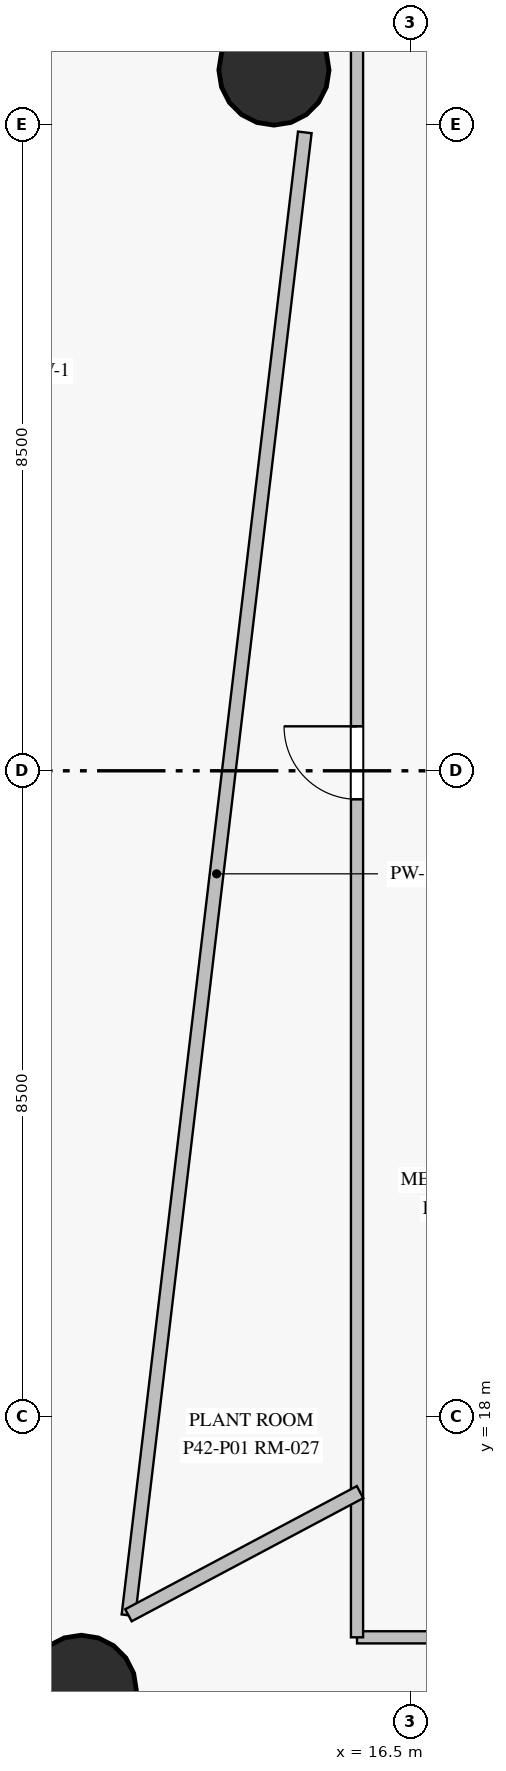
"""IFC4 building model, lengths in metres.
Left out: names, types, materials, properties, quantities, classifications, styles, units other than length and angle.
Written with IfcOpenShell. Run it as: python <this file> out.ifc"""

import sys

from ifc_helpers import new_model, si_unit, direction, frame, frame_2d, origin, origin_with_axes, origin_2d, place, context, subcontext, project, spatial, rectangle, circle, extrude, source, transform, mapped, element, fill, save


model = new_model("IFC4")
c1 = context("Model", 3, precision=1e-05, world=origin(), true_north=direction((0.0, 1.0)))
c2 = subcontext(c1, "Body", "Model", "MODEL_VIEW")
j1 = project(units=[si_unit("LENGTHUNIT", "METRE"), si_unit("PLANEANGLEUNIT", "RADIAN")], contexts=[c1])
p1 = place(None, origin())
s1 = spatial("IfcSite", under=j1, at=p1, CompositionType="ELEMENT")
p2 = place(p1, origin())
s2 = spatial("IfcBuilding", under=s1, at=p2, CompositionType="ELEMENT")
p3 = place(p2, frame((0.0, 0.0, 148.05)))
s3 = spatial("IfcBuildingStorey", under=s2, at=p3, CompositionType="ELEMENT", Elevation=148.05)
m1 = source(origin_with_axes(), c2, "Body", "SweptSolid", [
    extrude(circle(Radius=0.725, at=origin_2d()), origin(), (0.0, 0.0, 1.0), 4.5),
])
for number, where, z_axis, x_axis in (
    (1, (14.707, 35.719, 0.0), (0.0, 0.0, 1.0), (1.0, 0.0, 0.0)),
    (2, (12.172, 14.403, 0.0), (0.0, 0.0, 1.0), (1.0, 0.0, 0.0)),
):
    element("IfcColumn", number, at=place(p3, frame(where, z_axis=z_axis, x_axis=x_axis)), inside=s3, PredefinedType="COLUMN", context=c2, shape_type="MappedRepresentation", body=[
        mapped(m1, transform((0.0, 0.0, 0.0), scale=1.0)),
    ])
p4 = place(p3, frame((40.25, 15.1, 0.0), z_axis=(0.0, 0.0, 1.0), x_axis=(-1.0, 0.0, 0.0)))
e3 = element("IfcWall", 3, at=p4, inside=s3, PredefinedType="PARTITIONING", context=c2, shape_type="SweptSolid", body=[
    extrude(rectangle(XDim=24.45, YDim=0.16, at=frame_2d((12.225, 0.0))), origin(), (0.0, 0.0, 1.0), 2.875),
])
p5 = place(p4, frame((11.51, 0.0, 0.0)))
e4 = element("IfcOpeningElement", 4, at=p5, cuts=e3, PredefinedType="OPENING", context=c2, shape_type="SweptSolid", body=[
    extrude(rectangle(XDim=0.96, YDim=2.15, at=frame_2d((0.48, 1.075))), frame((0.0, 0.09, 0.0), z_axis=(0.0, -1.0, 0.0), x_axis=(1.0, 0.0, 0.0)), (0.0, 0.0, 1.0), 0.18),
])
p6 = place(p4, frame((17.863, 0.0, 0.0)))
e5 = element("IfcOpeningElement", 5, at=p6, cuts=e3, PredefinedType="OPENING", context=c2, shape_type="SweptSolid", body=[
    extrude(rectangle(XDim=0.96, YDim=2.15, at=frame_2d((0.48, 1.075))), frame((0.0, 0.09, 0.0), z_axis=(0.0, -1.0, 0.0), x_axis=(1.0, 0.0, 0.0)), (0.0, 0.0, 1.0), 0.18),
])
p7 = place(p4, frame((15.417, 0.0, 0.0)))
e6 = element("IfcOpeningElement", 6, at=p7, cuts=e3, PredefinedType="OPENING", context=c2, shape_type="SweptSolid", body=[
    extrude(rectangle(XDim=0.96, YDim=2.15, at=frame_2d((0.48, 1.075))), frame((0.0, 0.09, 0.0), z_axis=(0.0, -1.0, 0.0), x_axis=(1.0, 0.0, 0.0)), (0.0, 0.0, 1.0), 0.18),
])
p8 = place(p3, frame((15.8, 15.1, 0.0), z_axis=(0.0, 0.0, 1.0), x_axis=(0.0, 1.0, 0.0)))
e7 = element("IfcWall", 7, at=p8, inside=s3, PredefinedType="PARTITIONING", context=c2, shape_type="SweptSolid", body=[
    extrude(rectangle(XDim=23.0, YDim=0.16, at=frame_2d((11.5, 0.0))), origin(), (0.0, 0.0, 1.0), 2.875),
])
p9 = place(p8, frame((11.025, 0.0, 0.0)))
e8 = element("IfcOpeningElement", 8, at=p9, cuts=e7, PredefinedType="OPENING", context=c2, shape_type="SweptSolid", body=[
    extrude(rectangle(XDim=0.96, YDim=2.15, at=frame_2d((0.48, 1.075))), frame((0.0, 0.09, 0.0), z_axis=(0.0, -1.0, 0.0), x_axis=(1.0, 0.0, 0.0)), (0.0, 0.0, 1.0), 0.18),
])
p10 = place(p3, frame((12.793, 15.39, 0.0), z_axis=(0.0, 0.0, 1.0), x_axis=(0.118092107684, 0.993002645567, 0.0)))
e9 = element("IfcWall", 9, at=p10, inside=s3, PredefinedType="PARTITIONING", context=c2, shape_type="SweptSolid", body=[
    extrude(rectangle(XDim=19.646, YDim=0.18, at=frame_2d((9.823, 0.0))), origin(), (0.0, 0.0, 1.0), 3.375),
])
p11 = place(p3, frame((16.724, 9.88, 0.0), z_axis=(0.0, 0.0, 1.0), x_axis=(0.374579310396, 0.927194877155, 0.0)))
e10 = element("IfcWall", 10, at=p11, inside=s3, PredefinedType="PARTITIONING", context=c2, shape_type="SweptSolid", body=[
    extrude(rectangle(XDim=5.659, YDim=0.18, at=frame_2d((2.83, 0.0))), origin(), (0.0, 0.0, 1.0), 2.775),
])
p12 = place(p3, frame((15.84, 17.01, 0.0), z_axis=(0.0, 0.0, 1.0), x_axis=(-0.882924187659, -0.469515578917, 0.0)))
e11 = element("IfcWall", 11, at=p12, inside=s3, PredefinedType="PARTITIONING", context=c2, shape_type="SweptSolid", body=[
    extrude(rectangle(XDim=3.451, YDim=0.18, at=frame_2d((1.725, 0.0))), origin(), (0.0, 0.0, 1.0), 2.775),
])
m2 = source(origin_with_axes(), c2, "Body", "SweptSolid", [
    extrude(rectangle(XDim=0.96, YDim=2.15, at=frame_2d((0.48, 1.075))), frame((0.0, 0.025, 0.0), z_axis=(0.0, -1.0, 0.0), x_axis=(1.0, 0.0, 0.0)), (0.0, 0.0, 1.0), 0.05),
])
p13 = place(p9, origin())
e12 = element("IfcDoor", 12, at=p13, inside=s3, OperationType="SINGLE_SWING_RIGHT", PredefinedType="DOOR", context=c2, shape_type="MappedRepresentation", body=[
    mapped(m2, transform((0.0, 0.0, 0.0), scale=1.0)),
])
fill(e8, e12)
save(model, sys.argv[1])
